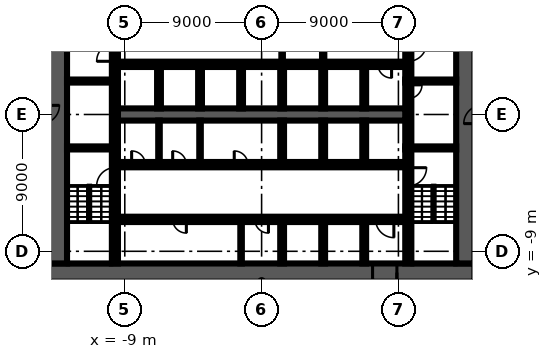
"""IFC4 building model, lengths in metres.
Left out: names, types, materials, properties, quantities, classifications, styles, units other than length and angle.
Written with IfcOpenShell. Run it as: python <this file> out.ifc"""

import sys

from ifc_helpers import new_model, si_unit, direction, frame, frame_2d, origin, place, context, subcontext, project, spatial, rectangle, extrude, element, fill, save


model = new_model("IFC4")
c1 = context("Model", 3, precision=1e-05, world=origin(), true_north=direction((0.0, 1.0)))
c2 = subcontext(c1, "Body", "Model", "MODEL_VIEW")
j1 = project(units=[si_unit("LENGTHUNIT", "METRE"), si_unit("PLANEANGLEUNIT", "RADIAN")], contexts=[c1])
p1 = place(None, origin())
s1 = spatial("IfcSite", under=j1, at=p1, CompositionType="ELEMENT")
p2 = place(p1, origin())
s2 = spatial("IfcBuilding", under=s1, at=p2, CompositionType="ELEMENT")
p3 = place(p2, frame((0.0, 0.0, -11.5)))
s3 = spatial("IfcBuildingStorey", under=s2, at=p3, CompositionType="ELEMENT", Elevation=-11.5)
p4 = place(p3, frame((14.0, -10.4, 0.0), z_axis=(0.0, 0.0, 1.0), x_axis=(-1.0, 0.0, 0.0)))
e1 = element("IfcWall", 1, at=p4, inside=s3, PredefinedType="SHEAR", context=c2, shape_type="SweptSolid", body=[
    extrude(rectangle(XDim=28.0, YDim=1.2, at=frame_2d((14.0, 0.0))), origin(), (0.0, 0.0, 1.0), 5.1),
])
p5 = place(p4, frame((5.1, 0.0, 0.0)))
e2 = element("IfcOpeningElement", 2, at=p5, cuts=e1, PredefinedType="OPENING", context=c2, shape_type="SweptSolid", body=[
    extrude(rectangle(XDim=1.6, YDim=2.1, at=frame_2d((0.8, 1.05))), frame((0.0, 0.61, 0.0), z_axis=(0.0, -1.0, 0.0), x_axis=(1.0, 0.0, 0.0)), (0.0, 0.0, 1.0), 1.22),
])
for number, where, z_axis, x_axis in (
    (3, (13.4, 9.8, 0.0), (0.0, 0.0, 1.0), (0.0, -1.0, 0.0)),
    (4, (-13.4, -9.8, 0.0), (0.0, 0.0, 1.0), (0.0, 1.0, 0.0)),
):
    element("IfcWall", number, at=place(p3, frame(where, z_axis=z_axis, x_axis=x_axis)), inside=s3, PredefinedType="SHEAR", context=c2, shape_type="SweptSolid", body=[
        extrude(rectangle(XDim=19.6, YDim=1.2, at=frame_2d((9.8, 0.0))), origin(), (0.0, 0.0, 1.0), 5.1),
    ])
p6 = place(p3, frame((9.65, -2.3, 0.0), z_axis=(0.0, 0.0, 1.0), x_axis=(0.0, -1.0, 0.0)))
e5 = element("IfcWall", 5, at=p6, inside=s3, PredefinedType="SHEAR", context=c2, shape_type="SweptSolid", body=[
    extrude(rectangle(XDim=7.5, YDim=0.4, at=frame_2d((3.75, 0.0))), origin(), (0.0, 0.0, 1.0), 5.1),
])
p7 = place(p6, frame((1.2, 0.0, 0.0)))
e6 = element("IfcOpeningElement", 6, at=p7, cuts=e5, PredefinedType="OPENING", context=c2, shape_type="SweptSolid", body=[
    extrude(rectangle(XDim=1.2, YDim=2.1, at=frame_2d((0.6, 1.05))), frame((0.0, 0.21, 0.0), z_axis=(0.0, -1.0, 0.0), x_axis=(1.0, 0.0, 0.0)), (0.0, 0.0, 1.0), 0.42),
])
p8 = place(p3, frame((9.65, 2.1, 0.0), z_axis=(0.0, 0.0, 1.0), x_axis=(0.0, -1.0, 0.0)))
e7 = element("IfcWall", 7, at=p8, inside=s3, PredefinedType="SHEAR", context=c2, shape_type="SweptSolid", body=[
    extrude(rectangle(XDim=4.2, YDim=0.4, at=frame_2d((2.1, 0.0))), origin(), (0.0, 0.0, 1.0), 5.1),
])
p9 = place(p8, frame((0.15, 0.0, 0.0)))
e8 = element("IfcOpeningElement", 8, at=p9, cuts=e7, PredefinedType="OPENING", context=c2, shape_type="SweptSolid", body=[
    extrude(rectangle(XDim=0.9, YDim=2.1, at=frame_2d((0.45, 1.05))), frame((0.0, 0.21, 0.0), z_axis=(0.0, -1.0, 0.0), x_axis=(1.0, 0.0, 0.0)), (0.0, 0.0, 1.0), 0.42),
])
p10 = place(p3, frame((9.65, 9.8, 0.0), z_axis=(0.0, 0.0, 1.0), x_axis=(0.0, -1.0, 0.0)))
e9 = element("IfcWall", 9, at=p10, inside=s3, PredefinedType="SHEAR", context=c2, shape_type="SweptSolid", body=[
    extrude(rectangle(XDim=7.5, YDim=0.4, at=frame_2d((3.75, 0.0))), origin(), (0.0, 0.0, 1.0), 5.1),
])
p11 = place(p10, frame((5.1, 0.0, 0.0)))
e10 = element("IfcOpeningElement", 10, at=p11, cuts=e9, PredefinedType="OPENING", context=c2, shape_type="SweptSolid", body=[
    extrude(rectangle(XDim=1.2, YDim=2.1, at=frame_2d((0.6, 1.05))), frame((0.0, 0.21, 0.0), z_axis=(0.0, -1.0, 0.0), x_axis=(1.0, 0.0, 0.0)), (0.0, 0.0, 1.0), 0.42),
])
p12 = place(p3, frame((-9.65, -9.8, 0.0), z_axis=(0.0, 0.0, 1.0), x_axis=(0.0, 1.0, 0.0)))
e11 = element("IfcWall", 11, at=p12, inside=s3, PredefinedType="SHEAR", context=c2, shape_type="SweptSolid", body=[
    extrude(rectangle(XDim=7.5, YDim=0.4, at=frame_2d((3.75, 0.0))), origin(), (0.0, 0.0, 1.0), 5.1),
])
p13 = place(p12, frame((5.1, 0.0, 0.0)))
e12 = element("IfcOpeningElement", 12, at=p13, cuts=e11, PredefinedType="OPENING", context=c2, shape_type="SweptSolid", body=[
    extrude(rectangle(XDim=1.2, YDim=2.1, at=frame_2d((0.6, 1.05))), frame((0.0, 0.21, 0.0), z_axis=(0.0, -1.0, 0.0), x_axis=(1.0, 0.0, 0.0)), (0.0, 0.0, 1.0), 0.42),
])
p14 = place(p3, frame((-9.65, -2.1, 0.0), z_axis=(0.0, 0.0, 1.0), x_axis=(0.0, 1.0, 0.0)))
e13 = element("IfcWall", 13, at=p14, inside=s3, PredefinedType="SHEAR", context=c2, shape_type="SweptSolid", body=[
    extrude(rectangle(XDim=4.2, YDim=0.4, at=frame_2d((2.1, 0.0))), origin(), (0.0, 0.0, 1.0), 5.1),
])
p15 = place(p3, frame((-9.65, 2.3, 0.0), z_axis=(0.0, 0.0, 1.0), x_axis=(0.0, 1.0, 0.0)))
e14 = element("IfcWall", 14, at=p15, inside=s3, PredefinedType="SHEAR", context=c2, shape_type="SweptSolid", body=[
    extrude(rectangle(XDim=7.5, YDim=0.4, at=frame_2d((3.75, 0.0))), origin(), (0.0, 0.0, 1.0), 5.1),
])
p16 = place(p15, frame((1.2, 0.0, 0.0)))
e15 = element("IfcOpeningElement", 15, at=p16, cuts=e14, PredefinedType="OPENING", context=c2, shape_type="SweptSolid", body=[
    extrude(rectangle(XDim=1.2, YDim=2.1, at=frame_2d((0.6, 1.05))), frame((0.0, 0.21, 0.0), z_axis=(0.0, -1.0, 0.0), x_axis=(1.0, 0.0, 0.0)), (0.0, 0.0, 1.0), 0.42),
])
for number, where, z_axis, x_axis in (
    (16, (9.45, 2.2, 0.0), (0.0, 0.0, 1.0), (1.0, 0.0, 0.0)),
    (17, (-9.45, 2.2, 0.0), (0.0, 0.0, 1.0), (-1.0, 0.0, 0.0)),
    (18, (9.45, -2.2, 0.0), (0.0, 0.0, 1.0), (1.0, 0.0, 0.0)),
    (19, (-9.45, -2.2, 0.0), (0.0, 0.0, 1.0), (-1.0, 0.0, 0.0)),
):
    element("IfcWall", number, at=place(p3, frame(where, z_axis=z_axis, x_axis=x_axis)), inside=s3, PredefinedType="SHEAR", context=c2, shape_type="SweptSolid", body=[
        extrude(rectangle(XDim=3.35, YDim=0.2, at=frame_2d((1.675, 0.0))), origin(), (0.0, 0.0, 1.0), 5.1),
    ])
p17 = place(p3, frame((9.45, 3.3, 0.0), z_axis=(0.0, 0.0, 1.0), x_axis=(-1.0, 0.0, 0.0)))
e20 = element("IfcWall", 20, at=p17, inside=s3, PredefinedType="SHEAR", context=c2, shape_type="SweptSolid", body=[
    extrude(rectangle(XDim=18.9, YDim=0.35, at=frame_2d((9.45, 0.0))), origin(), (0.0, 0.0, 1.0), 5.1),
])
p18 = place(p17, frame((6.2, 0.0, 0.0)))
e21 = element("IfcOpeningElement", 21, at=p18, cuts=e20, PredefinedType="OPENING", context=c2, shape_type="SweptSolid", body=[
    extrude(rectangle(XDim=1.1, YDim=2.1, at=frame_2d((0.55, 1.05))), frame((0.0, 0.185, 0.0), z_axis=(0.0, -1.0, 0.0), x_axis=(1.0, 0.0, 0.0)), (0.0, 0.0, 1.0), 0.37),
])
p19 = place(p17, frame((3.5, 0.0, 0.0)))
e22 = element("IfcOpeningElement", 22, at=p19, cuts=e20, PredefinedType="OPENING", context=c2, shape_type="SweptSolid", body=[
    extrude(rectangle(XDim=1.1, YDim=2.1, at=frame_2d((0.55, 1.05))), frame((0.0, 0.185, 0.0), z_axis=(0.0, -1.0, 0.0), x_axis=(1.0, 0.0, 0.0)), (0.0, 0.0, 1.0), 0.37),
])
p20 = place(p17, frame((0.9, 0.0, 0.0)))
e23 = element("IfcOpeningElement", 23, at=p20, cuts=e20, PredefinedType="OPENING", context=c2, shape_type="SweptSolid", body=[
    extrude(rectangle(XDim=0.9, YDim=2.1, at=frame_2d((0.45, 1.05))), frame((0.0, 0.185, 0.0), z_axis=(0.0, -1.0, 0.0), x_axis=(1.0, 0.0, 0.0)), (0.0, 0.0, 1.0), 0.37),
])
p21 = place(p3, frame((-9.45, -3.3, 0.0), z_axis=(0.0, 0.0, 1.0), x_axis=(1.0, 0.0, 0.0)))
e24 = element("IfcWall", 24, at=p21, inside=s3, PredefinedType="SHEAR", context=c2, shape_type="SweptSolid", body=[
    extrude(rectangle(XDim=18.9, YDim=0.35, at=frame_2d((9.45, 0.0))), origin(), (0.0, 0.0, 1.0), 5.1),
])
p22 = place(p21, frame((17.0, 0.0, 0.0)))
e25 = element("IfcOpeningElement", 25, at=p22, cuts=e24, PredefinedType="OPENING", context=c2, shape_type="SweptSolid", body=[
    extrude(rectangle(XDim=1.1, YDim=2.1, at=frame_2d((0.55, 1.05))), frame((0.0, 0.185, 0.0), z_axis=(0.0, -1.0, 0.0), x_axis=(1.0, 0.0, 0.0)), (0.0, 0.0, 1.0), 0.37),
])
p23 = place(p21, frame((0.9, 0.0, 0.0)))
e26 = element("IfcOpeningElement", 26, at=p23, cuts=e24, PredefinedType="OPENING", context=c2, shape_type="SweptSolid", body=[
    extrude(rectangle(XDim=0.9, YDim=2.1, at=frame_2d((0.45, 1.05))), frame((0.0, 0.185, 0.0), z_axis=(0.0, -1.0, 0.0), x_axis=(1.0, 0.0, 0.0)), (0.0, 0.0, 1.0), 0.37),
])
p24 = place(p21, frame((3.6, 0.0, 0.0)))
e27 = element("IfcOpeningElement", 27, at=p24, cuts=e24, PredefinedType="OPENING", context=c2, shape_type="SweptSolid", body=[
    extrude(rectangle(XDim=0.9, YDim=2.1, at=frame_2d((0.45, 1.05))), frame((0.0, 0.185, 0.0), z_axis=(0.0, -1.0, 0.0), x_axis=(1.0, 0.0, 0.0)), (0.0, 0.0, 1.0), 0.37),
])
p25 = place(p21, frame((7.65, 0.0, 0.0)))
e28 = element("IfcOpeningElement", 28, at=p25, cuts=e24, PredefinedType="OPENING", context=c2, shape_type="SweptSolid", body=[
    extrude(rectangle(XDim=0.9, YDim=2.1, at=frame_2d((0.45, 1.05))), frame((0.0, 0.185, 0.0), z_axis=(0.0, -1.0, 0.0), x_axis=(1.0, 0.0, 0.0)), (0.0, 0.0, 1.0), 0.37),
])
p26 = place(p3, frame((9.45, -6.9, 0.0), z_axis=(0.0, 0.0, 1.0), x_axis=(-1.0, 0.0, 0.0)))
e29 = element("IfcWall", 29, at=p26, inside=s3, PredefinedType="SHEAR", context=c2, shape_type="SweptSolid", body=[
    extrude(rectangle(XDim=18.9, YDim=0.35, at=frame_2d((9.45, 0.0))), origin(), (0.0, 0.0, 1.0), 5.1),
])
p27 = place(p26, frame((0.75, 0.0, 0.0)))
e30 = element("IfcOpeningElement", 30, at=p27, cuts=e29, PredefinedType="OPENING", context=c2, shape_type="SweptSolid", body=[
    extrude(rectangle(XDim=1.2, YDim=2.1, at=frame_2d((0.6, 1.05))), frame((0.0, 0.185, 0.0), z_axis=(0.0, -1.0, 0.0), x_axis=(1.0, 0.0, 0.0)), (0.0, 0.0, 1.0), 0.37),
])
p28 = place(p26, frame((14.4, 0.0, 0.0)))
e31 = element("IfcOpeningElement", 31, at=p28, cuts=e29, PredefinedType="OPENING", context=c2, shape_type="SweptSolid", body=[
    extrude(rectangle(XDim=0.9, YDim=2.1, at=frame_2d((0.45, 1.05))), frame((0.0, 0.185, 0.0), z_axis=(0.0, -1.0, 0.0), x_axis=(1.0, 0.0, 0.0)), (0.0, 0.0, 1.0), 0.37),
])
p29 = place(p26, frame((9.0, 0.0, 0.0)))
e32 = element("IfcOpeningElement", 32, at=p29, cuts=e29, PredefinedType="OPENING", context=c2, shape_type="SweptSolid", body=[
    extrude(rectangle(XDim=0.9, YDim=2.1, at=frame_2d((0.45, 1.05))), frame((0.0, 0.185, 0.0), z_axis=(0.0, -1.0, 0.0), x_axis=(1.0, 0.0, 0.0)), (0.0, 0.0, 1.0), 0.37),
])
p30 = place(p3, frame((-9.45, 0.0, 0.0), z_axis=(0.0, 0.0, 1.0), x_axis=(1.0, 0.0, 0.0)))
e33 = element("IfcWall", 33, at=p30, inside=s3, PredefinedType="SHEAR", context=c2, shape_type="SweptSolid", body=[
    extrude(rectangle(XDim=18.9, YDim=0.8, at=frame_2d((9.45, 0.0))), origin(), (0.0, 0.0, 1.0), 5.1),
])
for number, where, z_axis, x_axis in (
    (34, (6.75, -9.8, 0.0), (0.0, 0.0, 1.0), (0.0, 1.0, 0.0)),
    (35, (6.75, -3.125, 0.0), (0.0, 0.0, 1.0), (0.0, 1.0, 0.0)),
):
    element("IfcWall", number, at=place(p3, frame(where, z_axis=z_axis, x_axis=x_axis)), inside=s3, PredefinedType="SHEAR", context=c2, shape_type="SweptSolid", body=[
        extrude(rectangle(XDim=2.725, YDim=0.25, at=frame_2d((1.363, 0.0))), origin(), (0.0, 0.0, 1.0), 5.1),
    ])
p31 = place(p3, frame((6.75, 0.4, 0.0), z_axis=(0.0, 0.0, 1.0), x_axis=(0.0, 1.0, 0.0)))
e36 = element("IfcWall", 36, at=p31, inside=s3, PredefinedType="SOLIDWALL", context=c2, shape_type="SweptSolid", body=[
    extrude(rectangle(XDim=2.725, YDim=0.25, at=frame_2d((1.363, 0.0))), origin(), (0.0, 0.0, 1.0), 5.1),
])
p32 = place(p3, frame((4.05, 6.725, 0.0), z_axis=(0.0, 0.0, 1.0), x_axis=(0.0, -1.0, 0.0)))
e37 = element("IfcWall", 37, at=p32, inside=s3, PredefinedType="PARTITIONING", context=c2, shape_type="SweptSolid", body=[
    extrude(rectangle(XDim=3.25, YDim=0.15, at=frame_2d((1.625, 0.0))), origin(), (0.0, 0.0, 1.0), 5.1),
])
p33 = place(p32, frame((1.025, 0.0, 0.0)))
e38 = element("IfcOpeningElement", 38, at=p33, cuts=e37, PredefinedType="OPENING", context=c2, shape_type="SweptSolid", body=[
    extrude(rectangle(XDim=1.2, YDim=2.1, at=frame_2d((0.6, 1.05))), frame((0.0, 0.085, 0.0), z_axis=(0.0, -1.0, 0.0), x_axis=(1.0, 0.0, 0.0)), (0.0, 0.0, 1.0), 0.17),
])
for number, where, z_axis, x_axis in (
    (39, (4.05, -9.8, 0.0), (0.0, 0.0, 1.0), (0.0, 1.0, 0.0)),
    (40, (4.05, -3.125, 0.0), (0.0, 0.0, 1.0), (0.0, 1.0, 0.0)),
):
    element("IfcWall", number, at=place(p3, frame(where, z_axis=z_axis, x_axis=x_axis)), inside=s3, PredefinedType="SHEAR", context=c2, shape_type="SweptSolid", body=[
        extrude(rectangle(XDim=2.725, YDim=0.25, at=frame_2d((1.363, 0.0))), origin(), (0.0, 0.0, 1.0), 5.1),
    ])
p34 = place(p3, frame((4.05, 0.4, 0.0), z_axis=(0.0, 0.0, 1.0), x_axis=(0.0, 1.0, 0.0)))
e41 = element("IfcWall", 41, at=p34, inside=s3, PredefinedType="SOLIDWALL", context=c2, shape_type="SweptSolid", body=[
    extrude(rectangle(XDim=2.725, YDim=0.25, at=frame_2d((1.363, 0.0))), origin(), (0.0, 0.0, 1.0), 5.1),
])
p35 = place(p3, frame((1.35, 6.725, 0.0), z_axis=(0.0, 0.0, 1.0), x_axis=(0.0, -1.0, 0.0)))
e42 = element("IfcWall", 42, at=p35, inside=s3, PredefinedType="PARTITIONING", context=c2, shape_type="SweptSolid", body=[
    extrude(rectangle(XDim=3.25, YDim=0.1, at=frame_2d((1.625, 0.0))), origin(), (0.0, 0.0, 1.0), 5.1),
])
p36 = place(p35, frame((1.025, 0.0, 0.0)))
e43 = element("IfcOpeningElement", 43, at=p36, cuts=e42, PredefinedType="OPENING", context=c2, shape_type="SweptSolid", body=[
    extrude(rectangle(XDim=1.2, YDim=2.1, at=frame_2d((0.6, 1.05))), frame((0.0, 0.06, 0.0), z_axis=(0.0, -1.0, 0.0), x_axis=(1.0, 0.0, 0.0)), (0.0, 0.0, 1.0), 0.12),
])
for number, where, z_axis, x_axis in (
    (44, (1.35, -9.8, 0.0), (0.0, 0.0, 1.0), (0.0, 1.0, 0.0)),
    (45, (1.35, -3.125, 0.0), (0.0, 0.0, 1.0), (0.0, 1.0, 0.0)),
    (46, (1.35, 0.4, 0.0), (0.0, 0.0, 1.0), (0.0, 1.0, 0.0)),
):
    element("IfcWall", number, at=place(p3, frame(where, z_axis=z_axis, x_axis=x_axis)), inside=s3, PredefinedType="SHEAR", context=c2, shape_type="SweptSolid", body=[
        extrude(rectangle(XDim=2.725, YDim=0.25, at=frame_2d((1.363, 0.0))), origin(), (0.0, 0.0, 1.0), 5.1),
    ])
p37 = place(p3, frame((-1.35, -9.8, 0.0), z_axis=(0.0, 0.0, 1.0), x_axis=(0.0, 1.0, 0.0)))
e47 = element("IfcWall", 47, at=p37, inside=s3, PredefinedType="PARTITIONING", context=c2, shape_type="SweptSolid", body=[
    extrude(rectangle(XDim=2.725, YDim=0.1, at=frame_2d((1.363, 0.0))), origin(), (0.0, 0.0, 1.0), 5.1),
])
p38 = place(p3, frame((-1.35, 0.4, 0.0), z_axis=(0.0, 0.0, 1.0), x_axis=(0.0, 1.0, 0.0)))
e48 = element("IfcWall", 48, at=p38, inside=s3, PredefinedType="SHEAR", context=c2, shape_type="SweptSolid", body=[
    extrude(rectangle(XDim=2.725, YDim=0.25, at=frame_2d((1.363, 0.0))), origin(), (0.0, 0.0, 1.0), 5.1),
])
p39 = place(p3, frame((-4.05, -3.125, 0.0), z_axis=(0.0, 0.0, 1.0), x_axis=(0.0, 1.0, 0.0)))
e49 = element("IfcWall", 49, at=p39, inside=s3, PredefinedType="PARTITIONING", context=c2, shape_type="SweptSolid", body=[
    extrude(rectangle(XDim=2.725, YDim=0.1, at=frame_2d((1.363, 0.0))), origin(), (0.0, 0.0, 1.0), 5.1),
])
p40 = place(p3, frame((-4.05, 0.4, 0.0), z_axis=(0.0, 0.0, 1.0), x_axis=(0.0, 1.0, 0.0)))
e50 = element("IfcWall", 50, at=p40, inside=s3, PredefinedType="SHEAR", context=c2, shape_type="SweptSolid", body=[
    extrude(rectangle(XDim=2.725, YDim=0.25, at=frame_2d((1.363, 0.0))), origin(), (0.0, 0.0, 1.0), 5.1),
])
p41 = place(p3, frame((-6.75, -3.125, 0.0), z_axis=(0.0, 0.0, 1.0), x_axis=(0.0, 1.0, 0.0)))
e51 = element("IfcWall", 51, at=p41, inside=s3, PredefinedType="PARTITIONING", context=c2, shape_type="SweptSolid", body=[
    extrude(rectangle(XDim=2.725, YDim=0.1, at=frame_2d((1.363, 0.0))), origin(), (0.0, 0.0, 1.0), 5.1),
])
p42 = place(p3, frame((-6.75, 0.4, 0.0), z_axis=(0.0, 0.0, 1.0), x_axis=(0.0, 1.0, 0.0)))
e52 = element("IfcWall", 52, at=p42, inside=s3, PredefinedType="SHEAR", context=c2, shape_type="SweptSolid", body=[
    extrude(rectangle(XDim=2.725, YDim=0.25, at=frame_2d((1.363, 0.0))), origin(), (0.0, 0.0, 1.0), 5.1),
])
p43 = place(p9, origin())
e53 = element("IfcDoor", 53, at=p43, inside=s3, OperationType="SINGLE_SWING_RIGHT", PredefinedType="DOOR", context=c2, shape_type="SweptSolid", body=[
    extrude(rectangle(XDim=0.9, YDim=2.1, at=frame_2d((0.45, 1.05))), frame((0.0, 0.025, 0.0), z_axis=(0.0, -1.0, 0.0), x_axis=(1.0, 0.0, 0.0)), (0.0, 0.0, 1.0), 0.05),
])
fill(e8, e53)
p44 = place(p18, origin())
e54 = element("IfcDoor", 54, at=p44, inside=s3, OperationType="DOUBLE_DOOR_SLIDING", PredefinedType="DOOR", context=c2, shape_type="SweptSolid", body=[
    extrude(rectangle(XDim=1.1, YDim=2.1, at=frame_2d((0.55, 1.05))), frame((0.0, 0.025, 0.0), z_axis=(0.0, -1.0, 0.0), x_axis=(1.0, 0.0, 0.0)), (0.0, 0.0, 1.0), 0.05),
])
fill(e21, e54)
p45 = place(p19, origin())
e55 = element("IfcDoor", 55, at=p45, inside=s3, OperationType="DOUBLE_DOOR_SLIDING", PredefinedType="DOOR", context=c2, shape_type="SweptSolid", body=[
    extrude(rectangle(XDim=1.1, YDim=2.1, at=frame_2d((0.55, 1.05))), frame((0.0, 0.025, 0.0), z_axis=(0.0, -1.0, 0.0), x_axis=(1.0, 0.0, 0.0)), (0.0, 0.0, 1.0), 0.05),
])
fill(e22, e55)
p46 = place(p20, origin())
e56 = element("IfcDoor", 56, at=p46, inside=s3, OperationType="SINGLE_SWING_LEFT", PredefinedType="DOOR", context=c2, shape_type="SweptSolid", body=[
    extrude(rectangle(XDim=0.9, YDim=2.1, at=frame_2d((0.45, 1.05))), frame((0.0, 0.025, 0.0), z_axis=(0.0, -1.0, 0.0), x_axis=(1.0, 0.0, 0.0)), (0.0, 0.0, 1.0), 0.05),
])
fill(e23, e56)
p47 = place(p22, origin())
e57 = element("IfcDoor", 57, at=p47, inside=s3, OperationType="DOUBLE_DOOR_SLIDING", PredefinedType="DOOR", context=c2, shape_type="SweptSolid", body=[
    extrude(rectangle(XDim=1.1, YDim=2.1, at=frame_2d((0.55, 1.05))), frame((0.0, 0.025, 0.0), z_axis=(0.0, -1.0, 0.0), x_axis=(1.0, 0.0, 0.0)), (0.0, 0.0, 1.0), 0.05),
])
fill(e25, e57)
p48 = place(p5, origin())
e58 = element("IfcDoor", 58, at=p48, inside=s3, OperationType="DOUBLE_DOOR_SINGLE_SWING", PredefinedType="DOOR", context=c2, shape_type="SweptSolid", body=[
    extrude(rectangle(XDim=1.6, YDim=2.1, at=frame_2d((0.8, 1.05))), frame((0.0, 0.025, 0.0), z_axis=(0.0, -1.0, 0.0), x_axis=(1.0, 0.0, 0.0)), (0.0, 0.0, 1.0), 0.05),
])
fill(e2, e58)
p49 = place(p27, origin())
e59 = element("IfcDoor", 59, at=p49, inside=s3, OperationType="SINGLE_SWING_LEFT", PredefinedType="DOOR", context=c2, shape_type="SweptSolid", body=[
    extrude(rectangle(XDim=1.2, YDim=2.1, at=frame_2d((0.6, 1.05))), frame((0.0, 0.025, 0.0), z_axis=(0.0, -1.0, 0.0), x_axis=(1.0, 0.0, 0.0)), (0.0, 0.0, 1.0), 0.05),
])
fill(e30, e59)
p50 = place(p23, origin())
e60 = element("IfcDoor", 60, at=p50, inside=s3, OperationType="SINGLE_SWING_RIGHT", PredefinedType="DOOR", context=c2, shape_type="SweptSolid", body=[
    extrude(rectangle(XDim=0.9, YDim=2.1, at=frame_2d((0.45, 1.05))), frame((0.0, 0.025, 0.0), z_axis=(0.0, -1.0, 0.0), x_axis=(1.0, 0.0, 0.0)), (0.0, 0.0, 1.0), 0.05),
])
fill(e26, e60)
p51 = place(p24, origin())
e61 = element("IfcDoor", 61, at=p51, inside=s3, OperationType="SINGLE_SWING_LEFT", PredefinedType="DOOR", context=c2, shape_type="SweptSolid", body=[
    extrude(rectangle(XDim=0.9, YDim=2.1, at=frame_2d((0.45, 1.05))), frame((0.0, 0.025, 0.0), z_axis=(0.0, -1.0, 0.0), x_axis=(1.0, 0.0, 0.0)), (0.0, 0.0, 1.0), 0.05),
])
fill(e27, e61)
p52 = place(p25, origin())
e62 = element("IfcDoor", 62, at=p52, inside=s3, OperationType="SINGLE_SWING_RIGHT", PredefinedType="DOOR", context=c2, shape_type="SweptSolid", body=[
    extrude(rectangle(XDim=0.9, YDim=2.1, at=frame_2d((0.45, 1.05))), frame((0.0, 0.025, 0.0), z_axis=(0.0, -1.0, 0.0), x_axis=(1.0, 0.0, 0.0)), (0.0, 0.0, 1.0), 0.05),
])
fill(e28, e62)
p53 = place(p28, origin())
e63 = element("IfcDoor", 63, at=p53, inside=s3, OperationType="SINGLE_SWING_LEFT", PredefinedType="DOOR", context=c2, shape_type="SweptSolid", body=[
    extrude(rectangle(XDim=0.9, YDim=2.1, at=frame_2d((0.45, 1.05))), frame((0.0, 0.025, 0.0), z_axis=(0.0, -1.0, 0.0), x_axis=(1.0, 0.0, 0.0)), (0.0, 0.0, 1.0), 0.05),
])
fill(e31, e63)
p54 = place(p29, origin())
e64 = element("IfcDoor", 64, at=p54, inside=s3, OperationType="SINGLE_SWING_RIGHT", PredefinedType="DOOR", context=c2, shape_type="SweptSolid", body=[
    extrude(rectangle(XDim=0.9, YDim=2.1, at=frame_2d((0.45, 1.05))), frame((0.0, 0.025, 0.0), z_axis=(0.0, -1.0, 0.0), x_axis=(1.0, 0.0, 0.0)), (0.0, 0.0, 1.0), 0.05),
])
fill(e32, e64)
p55 = place(p11, origin())
e65 = element("IfcDoor", 65, at=p55, inside=s3, OperationType="SINGLE_SWING_LEFT", PredefinedType="DOOR", context=c2, shape_type="SweptSolid", body=[
    extrude(rectangle(XDim=1.2, YDim=2.1, at=frame_2d((0.6, 1.05))), frame((0.0, 0.025, 0.0), z_axis=(0.0, -1.0, 0.0), x_axis=(1.0, 0.0, 0.0)), (0.0, 0.0, 1.0), 0.05),
])
fill(e10, e65)
p56 = place(p16, origin())
e66 = element("IfcDoor", 66, at=p56, inside=s3, OperationType="SINGLE_SWING_RIGHT", PredefinedType="DOOR", context=c2, shape_type="SweptSolid", body=[
    extrude(rectangle(XDim=1.2, YDim=2.1, at=frame_2d((0.6, 1.05))), frame((0.0, 0.025, 0.0), z_axis=(0.0, -1.0, 0.0), x_axis=(1.0, 0.0, 0.0)), (0.0, 0.0, 1.0), 0.05),
])
fill(e15, e66)
p57 = place(p7, origin())
e67 = element("IfcDoor", 67, at=p57, inside=s3, OperationType="SINGLE_SWING_RIGHT", PredefinedType="DOOR", context=c2, shape_type="SweptSolid", body=[
    extrude(rectangle(XDim=1.2, YDim=2.1, at=frame_2d((0.6, 1.05))), frame((0.0, 0.025, 0.0), z_axis=(0.0, -1.0, 0.0), x_axis=(1.0, 0.0, 0.0)), (0.0, 0.0, 1.0), 0.05),
])
fill(e6, e67)
p58 = place(p13, origin())
e68 = element("IfcDoor", 68, at=p58, inside=s3, OperationType="SINGLE_SWING_LEFT", PredefinedType="DOOR", context=c2, shape_type="SweptSolid", body=[
    extrude(rectangle(XDim=1.2, YDim=2.1, at=frame_2d((0.6, 1.05))), frame((0.0, 0.025, 0.0), z_axis=(0.0, -1.0, 0.0), x_axis=(1.0, 0.0, 0.0)), (0.0, 0.0, 1.0), 0.05),
])
fill(e12, e68)
save(model, sys.argv[1])
